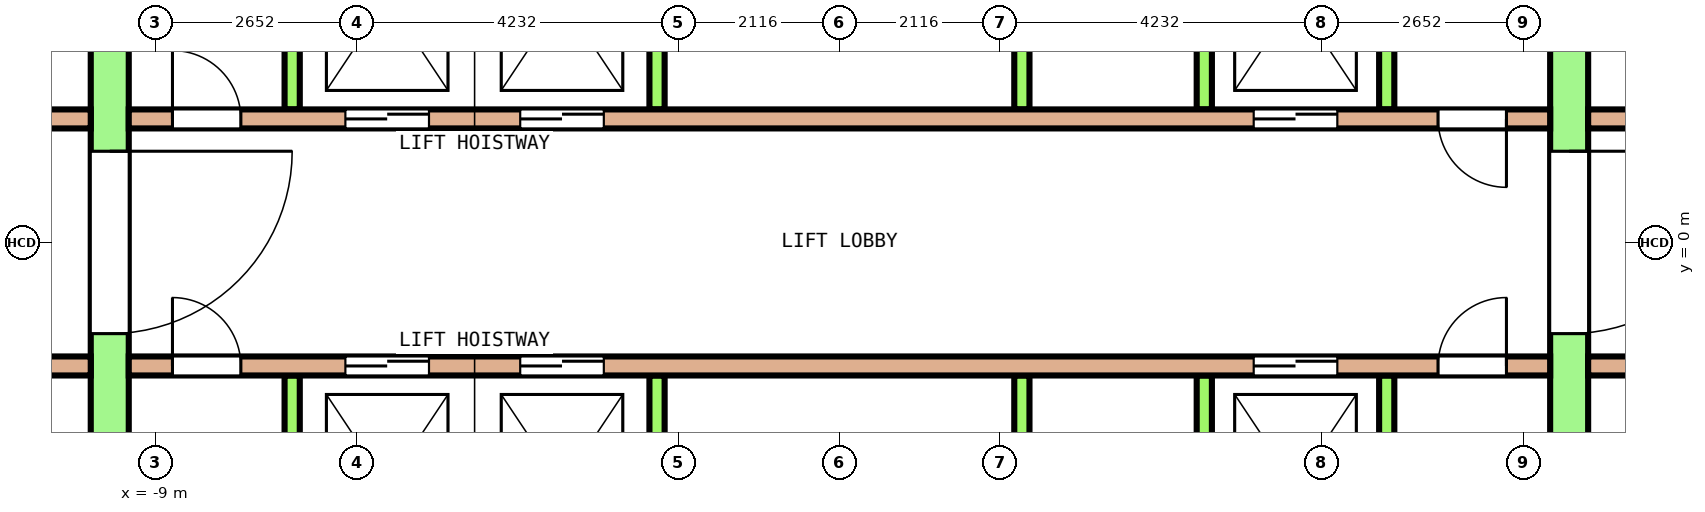
"""IFC4 building model, lengths in metres.
Left out: names, types, materials, properties, quantities, classifications, styles, units other than length and angle.
Written with IfcOpenShell. Run it as: python <this file> out.ifc"""

import sys

from ifc_helpers import new_model, si_unit, direction, frame, frame_2d, origin, place, context, subcontext, project, spatial, rectangle, extrude, element, fill, save


model = new_model("IFC4")
c1 = context("Model", 3, precision=1e-05, world=origin(), true_north=direction((0.0, 1.0)))
c2 = subcontext(c1, "Body", "Model", "MODEL_VIEW")
j1 = project(units=[si_unit("LENGTHUNIT", "METRE"), si_unit("PLANEANGLEUNIT", "RADIAN")], contexts=[c1])
p1 = place(None, origin())
s1 = spatial("IfcSite", under=j1, at=p1, CompositionType="ELEMENT")
p2 = place(p1, origin())
s2 = spatial("IfcBuilding", under=s1, at=p2, CompositionType="ELEMENT")
p3 = place(p2, frame((0.0, 0.0, 219.4)))
s3 = spatial("IfcBuildingStorey", under=s2, at=p3, CompositionType="ELEMENT", Elevation=219.4)
p4 = place(p3, frame((-9.6, -7.8, 0.0), z_axis=(0.0, 0.0, 1.0), x_axis=(0.0, 1.0, 0.0)))
e1 = element("IfcWall", 1, at=p4, inside=s3, PredefinedType="SHEAR", context=c2, shape_type="SweptSolid", body=[
    extrude(rectangle(XDim=15.6, YDim=0.5, at=frame_2d((7.8, 0.0))), origin(), (0.0, 0.0, 1.0), 3.7),
])
p5 = place(p4, frame((6.6, 0.0, 0.0)))
e2 = element("IfcOpeningElement", 2, at=p5, cuts=e1, PredefinedType="OPENING", context=c2, shape_type="SweptSolid", body=[
    extrude(rectangle(XDim=2.4, YDim=2.1, at=frame_2d((1.2, 1.05))), frame((0.0, 0.26, 0.0), z_axis=(0.0, -1.0, 0.0), x_axis=(1.0, 0.0, 0.0)), (0.0, 0.0, 1.0), 0.52),
])
p6 = place(p4, frame((13.5, 0.0, 0.0)))
e3 = element("IfcOpeningElement", 3, at=p6, cuts=e1, PredefinedType="OPENING", context=c2, shape_type="SweptSolid", body=[
    extrude(rectangle(XDim=1.2, YDim=2.1, at=frame_2d((0.6, 1.05))), frame((0.0, 0.26, 0.0), z_axis=(0.0, -1.0, 0.0), x_axis=(1.0, 0.0, 0.0)), (0.0, 0.0, 1.0), 0.52),
])
p7 = place(p4, frame((0.9, 0.0, 0.0)))
e4 = element("IfcOpeningElement", 4, at=p7, cuts=e1, PredefinedType="OPENING", context=c2, shape_type="SweptSolid", body=[
    extrude(rectangle(XDim=1.2, YDim=2.1, at=frame_2d((0.6, 1.05))), frame((0.0, 0.26, 0.0), z_axis=(0.0, -1.0, 0.0), x_axis=(1.0, 0.0, 0.0)), (0.0, 0.0, 1.0), 0.52),
])
p8 = place(p3, frame((9.6, -7.8, 0.0), z_axis=(0.0, 0.0, 1.0), x_axis=(0.0, 1.0, 0.0)))
e5 = element("IfcWall", 5, at=p8, inside=s3, PredefinedType="SHEAR", context=c2, shape_type="SweptSolid", body=[
    extrude(rectangle(XDim=15.6, YDim=0.5, at=frame_2d((7.8, 0.0))), origin(), (0.0, 0.0, 1.0), 3.7),
])
p9 = place(p8, frame((6.6, 0.0, 0.0)))
e6 = element("IfcOpeningElement", 6, at=p9, cuts=e5, PredefinedType="OPENING", context=c2, shape_type="SweptSolid", body=[
    extrude(rectangle(XDim=2.4, YDim=2.1, at=frame_2d((1.2, 1.05))), frame((0.0, 0.26, 0.0), z_axis=(0.0, -1.0, 0.0), x_axis=(1.0, 0.0, 0.0)), (0.0, 0.0, 1.0), 0.52),
])
p10 = place(p8, frame((13.5, 0.0, 0.0)))
e7 = element("IfcOpeningElement", 7, at=p10, cuts=e5, PredefinedType="OPENING", context=c2, shape_type="SweptSolid", body=[
    extrude(rectangle(XDim=1.2, YDim=2.1, at=frame_2d((0.6, 1.05))), frame((0.0, 0.26, 0.0), z_axis=(0.0, -1.0, 0.0), x_axis=(1.0, 0.0, 0.0)), (0.0, 0.0, 1.0), 0.52),
])
p11 = place(p8, frame((1.0, 0.0, 0.0)))
e8 = element("IfcOpeningElement", 8, at=p11, cuts=e5, PredefinedType="OPENING", context=c2, shape_type="SweptSolid", body=[
    extrude(rectangle(XDim=1.0, YDim=2.1, at=frame_2d((0.5, 1.05))), frame((0.0, 0.26, 0.0), z_axis=(0.0, -1.0, 0.0), x_axis=(1.0, 0.0, 0.0)), (0.0, 0.0, 1.0), 0.52),
])
p12 = place(p3, frame((-12.9, 1.625, 0.0), z_axis=(0.0, 0.0, 1.0), x_axis=(1.0, 0.0, 0.0)))
e9 = element("IfcWall", 9, at=p12, inside=s3, PredefinedType="SOLIDWALL", context=c2, shape_type="SweptSolid", body=[
    extrude(rectangle(XDim=3.05, YDim=0.25, at=frame_2d((1.525, 0.0))), origin(), (0.0, 0.0, 1.0), 3.7),
])
p13 = place(p12, frame((1.075, 0.0, 0.0)))
e10 = element("IfcOpeningElement", 10, at=p13, cuts=e9, PredefinedType="OPENING", context=c2, shape_type="SweptSolid", body=[
    extrude(rectangle(XDim=0.9, YDim=2.1, at=frame_2d((0.45, 1.05))), frame((0.0, 0.135, 0.0), z_axis=(0.0, -1.0, 0.0), x_axis=(1.0, 0.0, 0.0)), (0.0, 0.0, 1.0), 0.27),
])
p14 = place(p3, frame((-9.35, 1.625, 0.0), z_axis=(0.0, 0.0, 1.0), x_axis=(1.0, 0.0, 0.0)))
e11 = element("IfcWall", 11, at=p14, inside=s3, PredefinedType="SOLIDWALL", context=c2, shape_type="SweptSolid", body=[
    extrude(rectangle(XDim=18.7, YDim=0.25, at=frame_2d((9.35, 0.0))), origin(), (0.0, 0.0, 1.0), 3.7),
])
p15 = place(p14, frame((2.85, 0.0, 0.0)))
e12 = element("IfcOpeningElement", 12, at=p15, cuts=e11, PredefinedType="OPENING", context=c2, shape_type="SweptSolid", body=[
    extrude(rectangle(XDim=1.1, YDim=2.1, at=frame_2d((0.55, 1.05))), frame((0.0, 0.135, 0.0), z_axis=(0.0, -1.0, 0.0), x_axis=(1.0, 0.0, 0.0)), (0.0, 0.0, 1.0), 0.27),
])
p16 = place(p14, frame((5.15, 0.0, 0.0)))
e13 = element("IfcOpeningElement", 13, at=p16, cuts=e11, PredefinedType="OPENING", context=c2, shape_type="SweptSolid", body=[
    extrude(rectangle(XDim=1.1, YDim=2.1, at=frame_2d((0.55, 1.05))), frame((0.0, 0.135, 0.0), z_axis=(0.0, -1.0, 0.0), x_axis=(1.0, 0.0, 0.0)), (0.0, 0.0, 1.0), 0.27),
])
p17 = place(p14, frame((14.8, 0.0, 0.0)))
e14 = element("IfcOpeningElement", 14, at=p17, cuts=e11, PredefinedType="OPENING", context=c2, shape_type="SweptSolid", body=[
    extrude(rectangle(XDim=1.1, YDim=2.1, at=frame_2d((0.55, 1.05))), frame((0.0, 0.135, 0.0), z_axis=(0.0, -1.0, 0.0), x_axis=(1.0, 0.0, 0.0)), (0.0, 0.0, 1.0), 0.27),
])
p18 = place(p14, frame((0.575, 0.0, 0.0)))
e15 = element("IfcOpeningElement", 15, at=p18, cuts=e11, PredefinedType="OPENING", context=c2, shape_type="SweptSolid", body=[
    extrude(rectangle(XDim=0.9, YDim=2.1, at=frame_2d((0.45, 1.05))), frame((0.0, 0.135, 0.0), z_axis=(0.0, -1.0, 0.0), x_axis=(1.0, 0.0, 0.0)), (0.0, 0.0, 1.0), 0.27),
])
p19 = place(p14, frame((17.225, 0.0, 0.0)))
e16 = element("IfcOpeningElement", 16, at=p19, cuts=e11, PredefinedType="OPENING", context=c2, shape_type="SweptSolid", body=[
    extrude(rectangle(XDim=0.9, YDim=2.1, at=frame_2d((0.45, 1.05))), frame((0.0, 0.135, 0.0), z_axis=(0.0, -1.0, 0.0), x_axis=(1.0, 0.0, 0.0)), (0.0, 0.0, 1.0), 0.27),
])
p20 = place(p3, frame((9.85, 1.625, 0.0), z_axis=(0.0, 0.0, 1.0), x_axis=(1.0, 0.0, 0.0)))
e17 = element("IfcWall", 17, at=p20, inside=s3, PredefinedType="SOLIDWALL", context=c2, shape_type="SweptSolid", body=[
    extrude(rectangle(XDim=3.05, YDim=0.25, at=frame_2d((1.525, 0.0))), origin(), (0.0, 0.0, 1.0), 3.7),
])
p21 = place(p20, frame((1.075, 0.0, 0.0)))
e18 = element("IfcOpeningElement", 18, at=p21, cuts=e17, PredefinedType="OPENING", context=c2, shape_type="SweptSolid", body=[
    extrude(rectangle(XDim=0.9, YDim=2.1, at=frame_2d((0.45, 1.05))), frame((0.0, 0.135, 0.0), z_axis=(0.0, -1.0, 0.0), x_axis=(1.0, 0.0, 0.0)), (0.0, 0.0, 1.0), 0.27),
])
for number, where, z_axis, x_axis in (
    (19, (-7.2, 1.75, 0.0), (0.0, 0.0, 1.0), (0.0, 1.0, 0.0)),
    (20, (-2.4, 1.75, 0.0), (0.0, 0.0, 1.0), (0.0, 1.0, 0.0)),
    (21, (2.4, 1.75, 0.0), (0.0, 0.0, 1.0), (0.0, 1.0, 0.0)),
    (22, (4.8, 1.75, 0.0), (0.0, 0.0, 1.0), (0.0, 1.0, 0.0)),
    (23, (7.2, 1.75, 0.0), (0.0, 0.0, 1.0), (0.0, 1.0, 0.0)),
):
    element("IfcWall", number, at=place(p3, frame(where, z_axis=z_axis, x_axis=x_axis)), inside=s3, PredefinedType="SOLIDWALL", context=c2, shape_type="SweptSolid", body=[
        extrude(rectangle(XDim=2.9, YDim=0.2, at=frame_2d((1.45, 0.0))), origin(), (0.0, 0.0, 1.0), 3.7),
    ])
p22 = place(p3, frame((-12.9, -1.625, 0.0), z_axis=(0.0, 0.0, 1.0), x_axis=(1.0, 0.0, 0.0)))
e24 = element("IfcWall", 24, at=p22, inside=s3, PredefinedType="SOLIDWALL", context=c2, shape_type="SweptSolid", body=[
    extrude(rectangle(XDim=3.05, YDim=0.25, at=frame_2d((1.525, 0.0))), origin(), (0.0, 0.0, 1.0), 3.7),
])
p23 = place(p22, frame((1.075, 0.0, 0.0)))
e25 = element("IfcOpeningElement", 25, at=p23, cuts=e24, PredefinedType="OPENING", context=c2, shape_type="SweptSolid", body=[
    extrude(rectangle(XDim=0.9, YDim=2.1, at=frame_2d((0.45, 1.05))), frame((0.0, 0.135, 0.0), z_axis=(0.0, -1.0, 0.0), x_axis=(1.0, 0.0, 0.0)), (0.0, 0.0, 1.0), 0.27),
])
p24 = place(p3, frame((-9.35, -1.625, 0.0), z_axis=(0.0, 0.0, 1.0), x_axis=(1.0, 0.0, 0.0)))
e26 = element("IfcWall", 26, at=p24, inside=s3, PredefinedType="SOLIDWALL", context=c2, shape_type="SweptSolid", body=[
    extrude(rectangle(XDim=18.7, YDim=0.25, at=frame_2d((9.35, 0.0))), origin(), (0.0, 0.0, 1.0), 3.7),
])
p25 = place(p24, frame((2.85, 0.0, 0.0)))
e27 = element("IfcOpeningElement", 27, at=p25, cuts=e26, PredefinedType="OPENING", context=c2, shape_type="SweptSolid", body=[
    extrude(rectangle(XDim=1.1, YDim=2.1, at=frame_2d((0.55, 1.05))), frame((0.0, 0.135, 0.0), z_axis=(0.0, -1.0, 0.0), x_axis=(1.0, 0.0, 0.0)), (0.0, 0.0, 1.0), 0.27),
])
p26 = place(p24, frame((5.15, 0.0, 0.0)))
e28 = element("IfcOpeningElement", 28, at=p26, cuts=e26, PredefinedType="OPENING", context=c2, shape_type="SweptSolid", body=[
    extrude(rectangle(XDim=1.1, YDim=2.1, at=frame_2d((0.55, 1.05))), frame((0.0, 0.135, 0.0), z_axis=(0.0, -1.0, 0.0), x_axis=(1.0, 0.0, 0.0)), (0.0, 0.0, 1.0), 0.27),
])
p27 = place(p24, frame((14.8, 0.0, 0.0)))
e29 = element("IfcOpeningElement", 29, at=p27, cuts=e26, PredefinedType="OPENING", context=c2, shape_type="SweptSolid", body=[
    extrude(rectangle(XDim=1.1, YDim=2.1, at=frame_2d((0.55, 1.05))), frame((0.0, 0.135, 0.0), z_axis=(0.0, -1.0, 0.0), x_axis=(1.0, 0.0, 0.0)), (0.0, 0.0, 1.0), 0.27),
])
p28 = place(p24, frame((0.575, 0.0, 0.0)))
e30 = element("IfcOpeningElement", 30, at=p28, cuts=e26, PredefinedType="OPENING", context=c2, shape_type="SweptSolid", body=[
    extrude(rectangle(XDim=0.9, YDim=2.1, at=frame_2d((0.45, 1.05))), frame((0.0, 0.135, 0.0), z_axis=(0.0, -1.0, 0.0), x_axis=(1.0, 0.0, 0.0)), (0.0, 0.0, 1.0), 0.27),
])
p29 = place(p24, frame((17.225, 0.0, 0.0)))
e31 = element("IfcOpeningElement", 31, at=p29, cuts=e26, PredefinedType="OPENING", context=c2, shape_type="SweptSolid", body=[
    extrude(rectangle(XDim=0.9, YDim=2.1, at=frame_2d((0.45, 1.05))), frame((0.0, 0.135, 0.0), z_axis=(0.0, -1.0, 0.0), x_axis=(1.0, 0.0, 0.0)), (0.0, 0.0, 1.0), 0.27),
])
p30 = place(p3, frame((9.85, -1.625, 0.0), z_axis=(0.0, 0.0, 1.0), x_axis=(1.0, 0.0, 0.0)))
e32 = element("IfcWall", 32, at=p30, inside=s3, PredefinedType="SOLIDWALL", context=c2, shape_type="SweptSolid", body=[
    extrude(rectangle(XDim=3.05, YDim=0.25, at=frame_2d((1.525, 0.0))), origin(), (0.0, 0.0, 1.0), 3.7),
])
p31 = place(p30, frame((1.075, 0.0, 0.0)))
e33 = element("IfcOpeningElement", 33, at=p31, cuts=e32, PredefinedType="OPENING", context=c2, shape_type="SweptSolid", body=[
    extrude(rectangle(XDim=0.9, YDim=2.1, at=frame_2d((0.45, 1.05))), frame((0.0, 0.135, 0.0), z_axis=(0.0, -1.0, 0.0), x_axis=(1.0, 0.0, 0.0)), (0.0, 0.0, 1.0), 0.27),
])
for number, where, z_axis, x_axis in (
    (34, (-7.2, -4.65, 0.0), (0.0, 0.0, 1.0), (0.0, 1.0, 0.0)),
    (35, (-2.4, -4.65, 0.0), (0.0, 0.0, 1.0), (0.0, 1.0, 0.0)),
    (36, (2.4, -4.65, 0.0), (0.0, 0.0, 1.0), (0.0, 1.0, 0.0)),
    (37, (4.8, -4.65, 0.0), (0.0, 0.0, 1.0), (0.0, 1.0, 0.0)),
    (38, (7.2, -4.65, 0.0), (0.0, 0.0, 1.0), (0.0, 1.0, 0.0)),
):
    element("IfcWall", number, at=place(p3, frame(where, z_axis=z_axis, x_axis=x_axis)), inside=s3, PredefinedType="SOLIDWALL", context=c2, shape_type="SweptSolid", body=[
        extrude(rectangle(XDim=2.9, YDim=0.2, at=frame_2d((1.45, 0.0))), origin(), (0.0, 0.0, 1.0), 3.7),
    ])
p32 = place(p15, origin())
e39 = element("IfcDoor", 39, at=p32, inside=s3, OperationType="DOUBLE_DOOR_SLIDING", PredefinedType="DOOR", context=c2, shape_type="SweptSolid", body=[
    extrude(rectangle(XDim=1.1, YDim=2.1, at=frame_2d((0.55, 1.05))), frame((0.0, 0.075, 0.0), z_axis=(0.0, -1.0, 0.0), x_axis=(1.0, 0.0, 0.0)), (0.0, 0.0, 1.0), 0.15),
])
fill(e12, e39)
p33 = place(p16, origin())
e40 = element("IfcDoor", 40, at=p33, inside=s3, OperationType="DOUBLE_DOOR_SLIDING", PredefinedType="DOOR", context=c2, shape_type="SweptSolid", body=[
    extrude(rectangle(XDim=1.1, YDim=2.1, at=frame_2d((0.55, 1.05))), frame((0.0, 0.075, 0.0), z_axis=(0.0, -1.0, 0.0), x_axis=(1.0, 0.0, 0.0)), (0.0, 0.0, 1.0), 0.15),
])
fill(e13, e40)
p34 = place(p17, origin())
e41 = element("IfcDoor", 41, at=p34, inside=s3, OperationType="DOUBLE_DOOR_SLIDING", PredefinedType="DOOR", context=c2, shape_type="SweptSolid", body=[
    extrude(rectangle(XDim=1.1, YDim=2.1, at=frame_2d((0.55, 1.05))), frame((0.0, 0.075, 0.0), z_axis=(0.0, -1.0, 0.0), x_axis=(1.0, 0.0, 0.0)), (0.0, 0.0, 1.0), 0.15),
])
fill(e14, e41)
p35 = place(p25, origin())
e42 = element("IfcDoor", 42, at=p35, inside=s3, OperationType="DOUBLE_DOOR_SLIDING", PredefinedType="DOOR", context=c2, shape_type="SweptSolid", body=[
    extrude(rectangle(XDim=1.1, YDim=2.1, at=frame_2d((0.55, 1.05))), frame((0.0, 0.075, 0.0), z_axis=(0.0, -1.0, 0.0), x_axis=(1.0, 0.0, 0.0)), (0.0, 0.0, 1.0), 0.15),
])
fill(e27, e42)
p36 = place(p26, origin())
e43 = element("IfcDoor", 43, at=p36, inside=s3, OperationType="DOUBLE_DOOR_SLIDING", PredefinedType="DOOR", context=c2, shape_type="SweptSolid", body=[
    extrude(rectangle(XDim=1.1, YDim=2.1, at=frame_2d((0.55, 1.05))), frame((0.0, 0.075, 0.0), z_axis=(0.0, -1.0, 0.0), x_axis=(1.0, 0.0, 0.0)), (0.0, 0.0, 1.0), 0.15),
])
fill(e28, e43)
p37 = place(p27, origin())
e44 = element("IfcDoor", 44, at=p37, inside=s3, OperationType="DOUBLE_DOOR_SLIDING", PredefinedType="DOOR", context=c2, shape_type="SweptSolid", body=[
    extrude(rectangle(XDim=1.1, YDim=2.1, at=frame_2d((0.55, 1.05))), frame((0.0, 0.075, 0.0), z_axis=(0.0, -1.0, 0.0), x_axis=(1.0, 0.0, 0.0)), (0.0, 0.0, 1.0), 0.15),
])
fill(e29, e44)
p38 = place(p5, origin())
e45 = element("IfcDoor", 45, at=p38, inside=s3, OperationType="DOUBLE_DOOR_SINGLE_SWING", PredefinedType="DOOR", context=c2, shape_type="SweptSolid", body=[
    extrude(rectangle(XDim=2.4, YDim=2.1, at=frame_2d((1.2, 1.05))), frame((0.0, 0.2, 0.0), z_axis=(0.0, -1.0, 0.0), x_axis=(1.0, 0.0, 0.0)), (0.0, 0.0, 1.0), 0.4),
])
fill(e2, e45)
p39 = place(p9, origin())
e46 = element("IfcDoor", 46, at=p39, inside=s3, OperationType="DOUBLE_DOOR_SINGLE_SWING", PredefinedType="DOOR", context=c2, shape_type="SweptSolid", body=[
    extrude(rectangle(XDim=2.4, YDim=2.1, at=frame_2d((1.2, 1.05))), frame((0.0, 0.2, 0.0), z_axis=(0.0, -1.0, 0.0), x_axis=(1.0, 0.0, 0.0)), (0.0, 0.0, 1.0), 0.4),
])
fill(e6, e46)
p40 = place(p18, origin())
e47 = element("IfcDoor", 47, at=p40, inside=s3, OperationType="SINGLE_SWING_LEFT", PredefinedType="DOOR", context=c2, shape_type="SweptSolid", body=[
    extrude(rectangle(XDim=0.9, YDim=2.1, at=frame_2d((0.45, 1.05))), frame((0.0, 0.075, 0.0), z_axis=(0.0, -1.0, 0.0), x_axis=(1.0, 0.0, 0.0)), (0.0, 0.0, 1.0), 0.15),
])
fill(e15, e47)
p41 = place(p19, origin())
e48 = element("IfcDoor", 48, at=p41, inside=s3, OperationType="SINGLE_SWING_RIGHT", PredefinedType="DOOR", context=c2, shape_type="SweptSolid", body=[
    extrude(rectangle(XDim=0.9, YDim=2.1, at=frame_2d((0.45, 1.05))), frame((0.0, 0.075, 0.0), z_axis=(0.0, -1.0, 0.0), x_axis=(1.0, 0.0, 0.0)), (0.0, 0.0, 1.0), 0.15),
])
fill(e16, e48)
p42 = place(p28, origin())
e49 = element("IfcDoor", 49, at=p42, inside=s3, OperationType="SINGLE_SWING_LEFT", PredefinedType="DOOR", context=c2, shape_type="SweptSolid", body=[
    extrude(rectangle(XDim=0.9, YDim=2.1, at=frame_2d((0.45, 1.05))), frame((0.0, 0.075, 0.0), z_axis=(0.0, -1.0, 0.0), x_axis=(1.0, 0.0, 0.0)), (0.0, 0.0, 1.0), 0.15),
])
fill(e30, e49)
p43 = place(p29, origin())
e50 = element("IfcDoor", 50, at=p43, inside=s3, OperationType="SINGLE_SWING_RIGHT", PredefinedType="DOOR", context=c2, shape_type="SweptSolid", body=[
    extrude(rectangle(XDim=0.9, YDim=2.1, at=frame_2d((0.45, 1.05))), frame((0.0, 0.075, 0.0), z_axis=(0.0, -1.0, 0.0), x_axis=(1.0, 0.0, 0.0)), (0.0, 0.0, 1.0), 0.15),
])
fill(e31, e50)
save(model, sys.argv[1])
